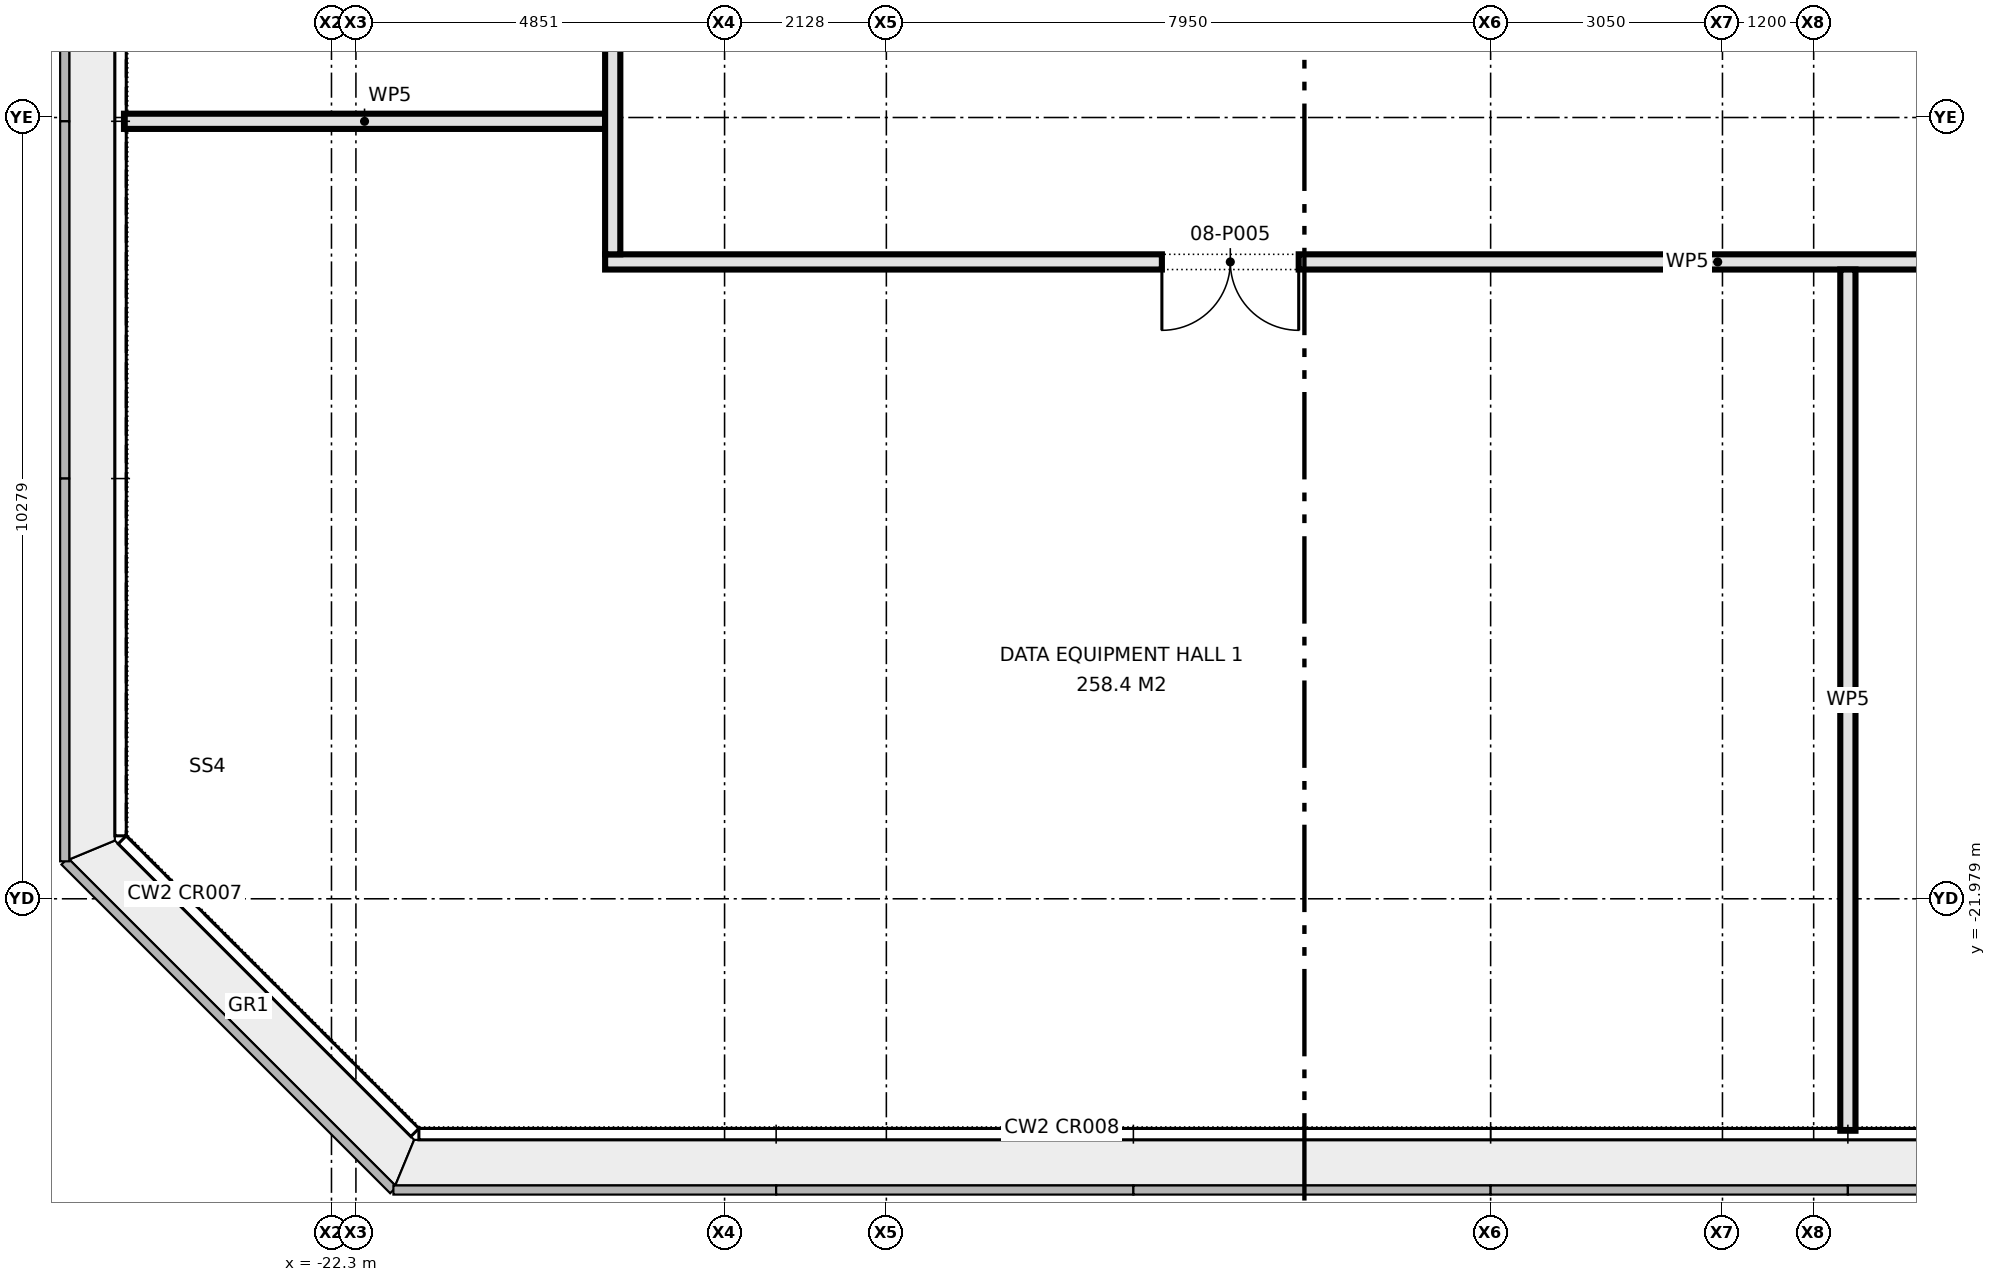
"""IFC4 building model, lengths in metres.
Left out: names, types, materials, properties, quantities, classifications, styles, units other than length and angle.
Written with IfcOpenShell. Run it as: python <this file> out.ifc"""

import sys

from ifc_helpers import new_model, si_unit, direction, frame, frame_2d, origin, place, context, subcontext, project, spatial, rectangle, extrude, element, fill, save


model = new_model("IFC4")
c1 = context("Model", 3, precision=1e-05, world=origin(), true_north=direction((0.0, 1.0)))
c2 = subcontext(c1, "Body", "Model", "MODEL_VIEW")
j1 = project(units=[si_unit("LENGTHUNIT", "METRE"), si_unit("PLANEANGLEUNIT", "RADIAN")], contexts=[c1])
p1 = place(None, origin())
s1 = spatial("IfcSite", under=j1, at=p1, CompositionType="ELEMENT")
p2 = place(p1, origin())
s2 = spatial("IfcBuilding", under=s1, at=p2, CompositionType="ELEMENT")
p3 = place(p2, frame((0.0, 0.0, 35.3)))
s3 = spatial("IfcBuildingStorey", under=s2, at=p3, CompositionType="ELEMENT", Elevation=35.3)
p4 = place(p3, frame((-18.7, -13.6, 0.0), z_axis=(0.0, 0.0, 1.0), x_axis=(1.0, 0.0, 0.0)))
e1 = element("IfcWall", 1, at=p4, inside=s3, PredefinedType="PARTITIONING", context=c2, shape_type="SweptSolid", body=[
    extrude(rectangle(XDim=37.4, YDim=0.2, at=frame_2d((18.7, 0.0))), origin(), (0.0, 0.0, 1.0), 4.575),
])
p5 = place(p4, frame((7.325, 0.0, 0.0)))
e2 = element("IfcOpeningElement", 2, at=p5, cuts=e1, PredefinedType="OPENING", context=c2, shape_type="SweptSolid", body=[
    extrude(rectangle(XDim=1.8, YDim=2.1, at=frame_2d((0.9, 1.05))), frame((0.0, 0.11, 0.0), z_axis=(0.0, -1.0, 0.0), x_axis=(1.0, 0.0, 0.0)), (0.0, 0.0, 1.0), 0.22),
])
p6 = place(p4, frame((20.15, 0.0, 0.0)))
e3 = element("IfcOpeningElement", 3, at=p6, cuts=e1, PredefinedType="OPENING", context=c2, shape_type="SweptSolid", body=[
    extrude(rectangle(XDim=1.8, YDim=2.1, at=frame_2d((0.9, 1.05))), frame((0.0, 0.11, 0.0), z_axis=(0.0, -1.0, 0.0), x_axis=(1.0, 0.0, 0.0)), (0.0, 0.0, 1.0), 0.22),
])
p7 = place(p4, frame((31.875, 0.0, 0.0)))
e4 = element("IfcOpeningElement", 4, at=p7, cuts=e1, PredefinedType="OPENING", context=c2, shape_type="SweptSolid", body=[
    extrude(rectangle(XDim=1.8, YDim=2.1, at=frame_2d((0.9, 1.05))), frame((0.0, 0.11, 0.0), z_axis=(0.0, -1.0, 0.0), x_axis=(1.0, 0.0, 0.0)), (0.0, 0.0, 1.0), 0.22),
])
p8 = place(p4, frame((26.4, 0.0, 0.0)))
e5 = element("IfcOpeningElement", 5, at=p8, cuts=e1, PredefinedType="OPENING", context=c2, shape_type="SweptSolid", body=[
    extrude(rectangle(XDim=1.2, YDim=2.1, at=frame_2d((0.6, 1.05))), frame((0.0, 0.11, 0.0), z_axis=(0.0, -1.0, 0.0), x_axis=(1.0, 0.0, 0.0)), (0.0, 0.0, 1.0), 0.22),
])
p9 = place(p3, frame((-25.03, -11.75, 0.0), z_axis=(0.0, 0.0, 1.0), x_axis=(1.0, 0.0, 0.0)))
e6 = element("IfcWall", 6, at=p9, inside=s3, PredefinedType="PARTITIONING", context=c2, shape_type="SweptSolid", body=[
    extrude(rectangle(XDim=6.33, YDim=0.2, at=frame_2d((3.165, 0.0))), origin(), (0.0, 0.0, 1.0), 4.575),
])
p10 = place(p3, frame((-2.35, -25.03, 0.0), z_axis=(0.0, 0.0, 1.0), x_axis=(0.0, 1.0, 0.0)))
e7 = element("IfcWall", 7, at=p10, inside=s3, PredefinedType="PARTITIONING", context=c2, shape_type="SweptSolid", body=[
    extrude(rectangle(XDim=11.33, YDim=0.2, at=frame_2d((5.665, 0.0))), origin(), (0.0, 0.0, 1.0), 4.575),
])
p11 = place(p3, frame((-18.6, -13.5, 0.0), z_axis=(0.0, 0.0, 1.0), x_axis=(0.0, 1.0, 0.0)))
e8 = element("IfcWall", 8, at=p11, inside=s3, PredefinedType="PARTITIONING", context=c2, shape_type="SweptSolid", body=[
    extrude(rectangle(XDim=27.0, YDim=0.2, at=frame_2d((13.5, 0.0))), origin(), (0.0, 0.0, 1.0), 4.575),
])
p12 = place(p11, frame((12.6, 0.0, 0.0)))
e9 = element("IfcOpeningElement", 9, at=p12, cuts=e8, PredefinedType="OPENING", context=c2, shape_type="SweptSolid", body=[
    extrude(rectangle(XDim=1.8, YDim=2.1, at=frame_2d((0.9, 1.05))), frame((0.0, 0.11, 0.0), z_axis=(0.0, -1.0, 0.0), x_axis=(1.0, 0.0, 0.0)), (0.0, 0.0, 1.0), 0.22),
])
p13 = place(p5, frame((1.8, 0.0, 0.0), z_axis=(0.0, 0.0, 1.0), x_axis=(-1.0, 0.0, 0.0)))
e10 = element("IfcDoor", 10, at=p13, inside=s3, OperationType="DOUBLE_DOOR_SINGLE_SWING", PredefinedType="DOOR", context=c2, shape_type="SweptSolid", body=[
    extrude(rectangle(XDim=1.8, YDim=2.1, at=frame_2d((0.9, 1.05))), frame((0.0, 0.025, 0.0), z_axis=(0.0, -1.0, 0.0), x_axis=(1.0, 0.0, 0.0)), (0.0, 0.0, 1.0), 0.05),
])
fill(e2, e10)
save(model, sys.argv[1])
